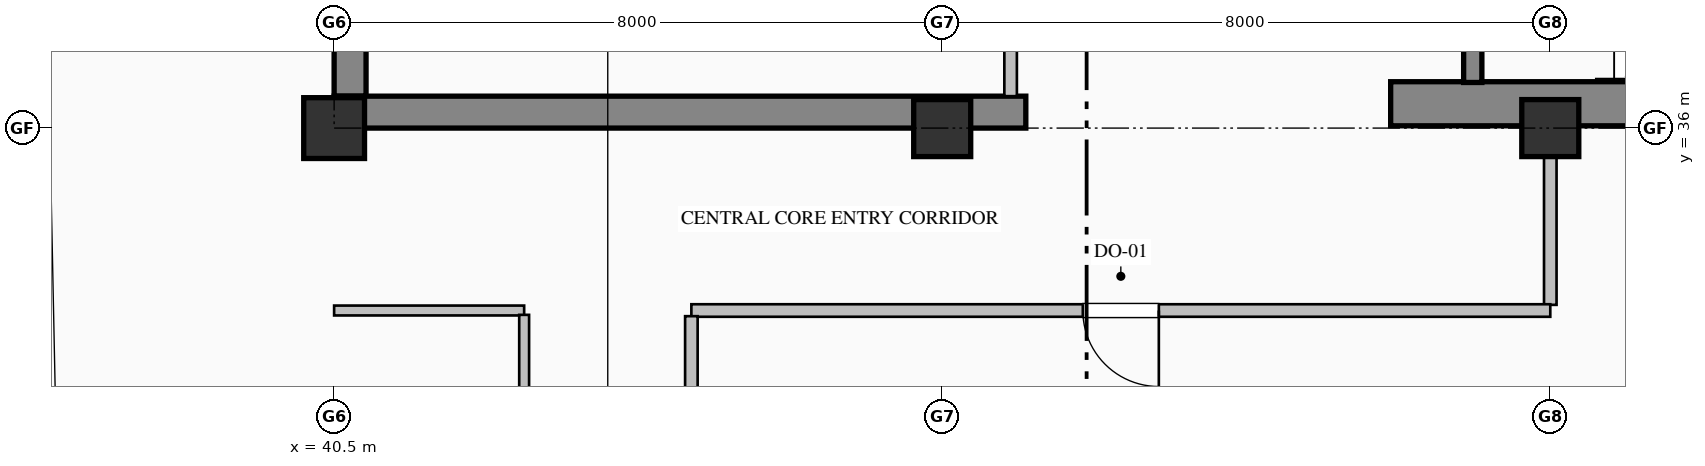
"""IFC4 building model, lengths in metres.
Left out: names, types, materials, properties, quantities, classifications, styles, units other than length and angle.
Written with IfcOpenShell. Run it as: python <this file> out.ifc"""

import sys

from ifc_helpers import new_model, si_unit, direction, frame, frame_2d, origin, origin_2d, place, context, subcontext, project, spatial, rectangle, hollow_rectangle, extrude, element, fill, save


model = new_model("IFC4")
c1 = context("Model", 3, precision=1e-05, world=origin(), true_north=direction((0.0, 1.0)))
c2 = subcontext(c1, "Body", "Model", "MODEL_VIEW")
j1 = project(units=[si_unit("LENGTHUNIT", "METRE"), si_unit("PLANEANGLEUNIT", "RADIAN")], contexts=[c1])
p1 = place(None, origin())
s1 = spatial("IfcSite", under=j1, at=p1, CompositionType="ELEMENT")
p2 = place(p1, origin())
s2 = spatial("IfcBuilding", under=s1, at=p2, CompositionType="ELEMENT")
p3 = place(p2, frame((0.0, 0.0, 359.2)))
s3 = spatial("IfcBuildingStorey", under=s2, at=p3, CompositionType="ELEMENT", Elevation=359.2)
p4 = place(p3, frame((40.71, 36.42, 0.0), z_axis=(0.0, 0.0, 1.0), x_axis=(0.0, 1.0, 0.0)))
e1 = element("IfcWall", 1, at=p4, inside=s3, PredefinedType="SHEAR", context=c2, shape_type="SweptSolid", body=[
    extrude(rectangle(XDim=7.98, YDim=0.42, at=frame_2d((3.99, 0.0))), origin(), (0.0, 0.0, 1.0), 3.785),
])
p5 = place(p3, frame((40.5, 36.21, 0.0), z_axis=(0.0, 0.0, 1.0), x_axis=(1.0, 0.0, 0.0)))
e2 = element("IfcWall", 2, at=p5, inside=s3, PredefinedType="SHEAR", context=c2, shape_type="SweptSolid", body=[
    extrude(rectangle(XDim=9.1, YDim=0.42, at=frame_2d((4.55, 0.0))), origin(), (0.0, 0.0, 1.0), 3.785),
])
p6 = place(p3, frame((54.4, 36.32, 0.0), z_axis=(0.0, 0.0, 1.0), x_axis=(1.0, 0.0, 0.0)))
e3 = element("IfcWall", 3, at=p6, inside=s3, PredefinedType="SHEAR", context=c2, shape_type="SweptSolid", body=[
    extrude(rectangle(XDim=9.6, YDim=0.58, at=frame_2d((4.8, 0.0))), origin(), (0.0, 0.0, 1.0), 4.0),
])
p7 = place(p3, frame((40.5, 36.0, 0.0), z_axis=(0.0, 0.0, 1.0), x_axis=(1.0, 0.0, 0.0)))
e4 = element("IfcColumn", 4, at=p7, inside=s3, PredefinedType="COLUMN", context=c2, shape_type="SweptSolid", body=[
    extrude(hollow_rectangle(XDim=0.8, YDim=0.8, WallThickness=0.032, at=origin_2d()), origin(), (0.0, 0.0, 1.0), 4.0),
])
for number, where, z_axis, x_axis in (
    (5, (48.5, 36.0, 0.0), (0.0, 0.0, 1.0), (1.0, 0.0, 0.0)),
    (6, (56.5, 36.0, 0.0), (0.0, 0.0, 1.0), (1.0, 0.0, 0.0)),
):
    element("IfcColumn", number, at=place(p3, frame(where, z_axis=z_axis, x_axis=x_axis)), inside=s3, PredefinedType="COLUMN", context=c2, shape_type="SweptSolid", body=[
        extrude(rectangle(XDim=0.75, YDim=0.75, at=origin_2d()), origin(), (0.0, 0.0, 1.0), 4.0),
    ])
p8 = place(p3, frame((55.48, 39.75, 0.0), z_axis=(0.0, 0.0, 1.0), x_axis=(0.0, -1.0, 0.0)))
e7 = element("IfcWall", 7, at=p8, inside=s3, PredefinedType="SOLIDWALL", context=c2, shape_type="SweptSolid", body=[
    extrude(rectangle(XDim=3.15, YDim=0.24, at=frame_2d((1.575, 0.0))), origin(), (0.0, 0.0, 1.0), 4.0),
])
p9 = place(p8, frame((1.0, 0.0, 0.0)))
e8 = element("IfcOpeningElement", 8, at=p9, cuts=e7, PredefinedType="OPENING", context=c2, shape_type="SweptSolid", body=[
    extrude(rectangle(XDim=1.15, YDim=2.2, at=frame_2d((0.575, 1.1))), frame((0.0, 0.13, 0.0), z_axis=(0.0, -1.0, 0.0), x_axis=(1.0, 0.0, 0.0)), (0.0, 0.0, 1.0), 0.26),
])
p10 = place(p3, frame((49.4, 36.42, 0.0), z_axis=(0.0, 0.0, 1.0), x_axis=(0.0, 1.0, 0.0)))
e9 = element("IfcWall", 9, at=p10, inside=s3, PredefinedType="PARTITIONING", context=c2, shape_type="SweptSolid", body=[
    extrude(rectangle(XDim=3.893, YDim=0.165, at=frame_2d((1.947, 0.0))), origin(), (0.0, 0.0, 1.0), 3.027),
])
p11 = place(p10, frame((1.497, 0.0, 0.0)))
e10 = element("IfcOpeningElement", 10, at=p11, cuts=e9, PredefinedType="OPENING", context=c2, shape_type="SweptSolid", body=[
    extrude(rectangle(XDim=0.9, YDim=2.15, at=frame_2d((0.45, 1.075))), frame((0.0, 0.093, 0.0), z_axis=(0.0, -1.0, 0.0), x_axis=(1.0, 0.0, 0.0)), (0.0, 0.0, 1.0), 0.185),
])
p12 = place(p3, frame((56.5, 36.0, 0.0), z_axis=(0.0, 0.0, 1.0), x_axis=(0.0, -1.0, 0.0)))
e11 = element("IfcWall", 11, at=p12, inside=s3, PredefinedType="PARTITIONING", context=c2, shape_type="SweptSolid", body=[
    extrude(rectangle(XDim=2.325, YDim=0.165, at=frame_2d((1.163, 0.0))), origin(), (0.0, 0.0, 1.0), 3.177),
])
p13 = place(p3, frame((56.5, 33.6, 0.0), z_axis=(0.0, 0.0, 1.0), x_axis=(-1.0, 0.0, 0.0)))
e12 = element("IfcWall", 12, at=p13, inside=s3, PredefinedType="PARTITIONING", context=c2, shape_type="SweptSolid", body=[
    extrude(rectangle(XDim=11.3, YDim=0.165, at=frame_2d((5.65, 0.0))), origin(), (0.0, 0.0, 1.0), 3.785),
])
p14 = place(p13, frame((5.15, 0.0, 0.0)))
e13 = element("IfcOpeningElement", 13, at=p14, cuts=e12, PredefinedType="OPENING", context=c2, shape_type="SweptSolid", body=[
    extrude(rectangle(XDim=1.0, YDim=2.15, at=frame_2d((0.5, 1.075))), frame((0.0, 0.093, 0.0), z_axis=(0.0, -1.0, 0.0), x_axis=(1.0, 0.0, 0.0)), (0.0, 0.0, 1.0), 0.185),
])
p15 = place(p3, frame((43.0, 33.6, 0.0), z_axis=(0.0, 0.0, 1.0), x_axis=(-1.0, 0.0, 0.0)))
e14 = element("IfcWall", 14, at=p15, inside=s3, PredefinedType="PARTITIONING", context=c2, shape_type="SweptSolid", body=[
    extrude(rectangle(XDim=2.5, YDim=0.13, at=frame_2d((1.25, 0.0))), origin(), (0.0, 0.0, 1.0), 3.785),
])
p16 = place(p3, frame((45.2, 33.525, 0.0), z_axis=(0.0, 0.0, 1.0), x_axis=(0.0, -1.0, 0.0)))
e15 = element("IfcWall", 15, at=p16, inside=s3, PredefinedType="PARTITIONING", context=c2, shape_type="SweptSolid", body=[
    extrude(rectangle(XDim=3.528, YDim=0.165, at=frame_2d((1.764, 0.0))), origin(), (0.0, 0.0, 1.0), 3.785),
])
p17 = place(p3, frame((43.0, 22.875, 0.0), z_axis=(0.0, 0.0, 1.0), x_axis=(0.0, 1.0, 0.0)))
e16 = element("IfcWall", 16, at=p17, inside=s3, PredefinedType="PARTITIONING", context=c2, shape_type="SweptSolid", body=[
    extrude(rectangle(XDim=10.668, YDim=0.13, at=frame_2d((5.334, 0.0))), origin(), (0.0, 0.0, 1.0), 3.785),
])
p18 = place(p17, frame((4.834, 0.0, 0.0)))
e17 = element("IfcOpeningElement", 17, at=p18, cuts=e16, PredefinedType="OPENING", context=c2, shape_type="SweptSolid", body=[
    extrude(rectangle(XDim=1.0, YDim=2.15, at=frame_2d((0.5, 1.075))), frame((0.0, 0.075, 0.0), z_axis=(0.0, -1.0, 0.0), x_axis=(1.0, 0.0, 0.0)), (0.0, 0.0, 1.0), 0.15),
])
p19 = place(p14, origin())
e18 = element("IfcDoor", 18, at=p19, inside=s3, OperationType="SINGLE_SWING_LEFT", PredefinedType="DOOR", context=c2, shape_type="SweptSolid", body=[
    extrude(rectangle(XDim=1.0, YDim=2.15, at=frame_2d((0.5, 1.075))), frame((0.0, 0.025, 0.0), z_axis=(0.0, -1.0, 0.0), x_axis=(1.0, 0.0, 0.0)), (0.0, 0.0, 1.0), 0.05),
])
fill(e13, e18)
save(model, sys.argv[1])
